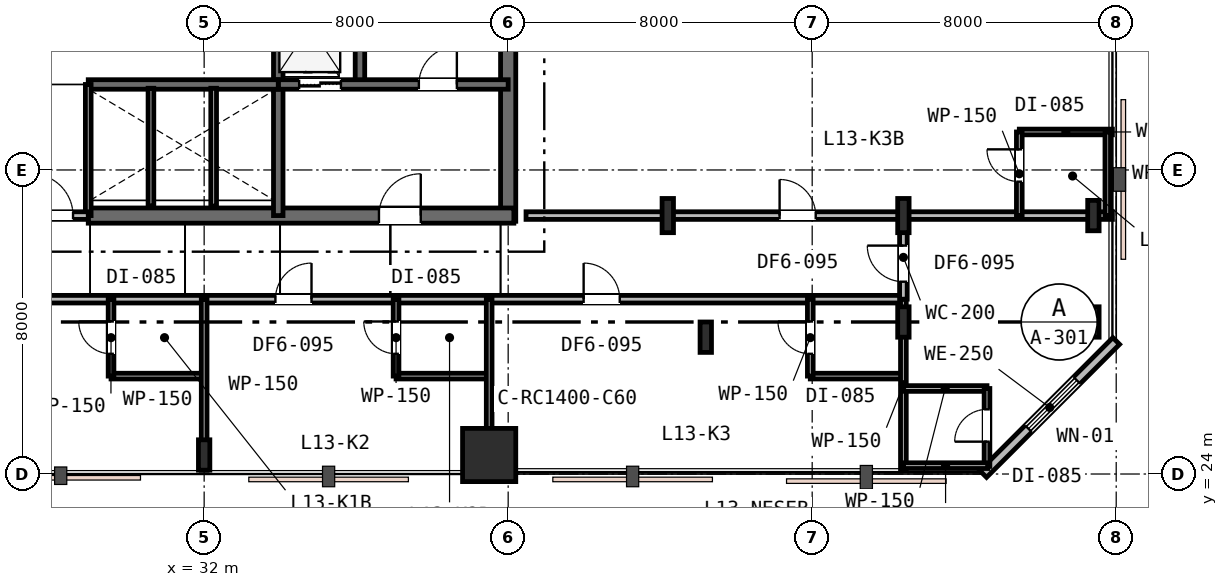
"""IFC4 building model, lengths in metres.
Left out: names, types, materials, properties, quantities, classifications, styles, units other than length and angle.
Written with IfcOpenShell. Run it as: python <this file> out.ifc"""

import sys

from ifc_helpers import new_model, si_unit, direction, frame, frame_2d, origin, origin_2d, place, context, subcontext, project, spatial, rectangle, i_section, extrude, element, fill, save


model = new_model("IFC4")
c1 = context("Model", 3, precision=1e-05, world=origin(), true_north=direction((0.0, 1.0)))
c2 = subcontext(c1, "Body", "Model", "MODEL_VIEW")
j1 = project(units=[si_unit("LENGTHUNIT", "METRE"), si_unit("PLANEANGLEUNIT", "RADIAN")], contexts=[c1])
p1 = place(None, origin())
s1 = spatial("IfcSite", under=j1, at=p1, CompositionType="ELEMENT")
p2 = place(p1, origin())
s2 = spatial("IfcBuilding", under=s1, at=p2, CompositionType="ELEMENT")
p3 = place(p2, frame((0.0, 0.0, 54.6)))
s3 = spatial("IfcBuildingStorey", under=s2, at=p3, CompositionType="ELEMENT", Elevation=54.6)
p4 = place(p3, frame((40.0, 30.65, 0.0), z_axis=(0.0, 0.0, 1.0), x_axis=(0.0, 1.0, 0.0)))
e1 = element("IfcWall", 1, at=p4, inside=s3, PredefinedType="SHEAR", context=c2, shape_type="SweptSolid", body=[
    extrude(rectangle(XDim=12.3, YDim=0.4, at=frame_2d((6.15, 0.0))), origin(), (0.0, 0.0, 1.0), 3.6),
])
p5 = place(p3, frame((28.95, 30.8, 0.0), z_axis=(0.0, 0.0, 1.0), x_axis=(1.0, 0.0, 0.0)))
e2 = element("IfcWall", 2, at=p5, inside=s3, PredefinedType="SHEAR", context=c2, shape_type="SweptSolid", body=[
    extrude(rectangle(XDim=11.2, YDim=0.4, at=frame_2d((5.6, 0.0))), origin(), (0.0, 0.0, 1.0), 3.6),
])
p6 = place(p5, frame((7.65, 0.0, 0.0)))
e3 = element("IfcOpeningElement", 3, at=p6, cuts=e2, PredefinedType="OPENING", context=c2, shape_type="SweptSolid", body=[
    extrude(rectangle(XDim=1.1, YDim=2.15, at=frame_2d((0.55, 1.075))), frame((0.0, 0.21, 0.0), z_axis=(0.0, -1.0, 0.0), x_axis=(1.0, 0.0, 0.0)), (0.0, 0.0, 1.0), 0.42),
])
p7 = place(p3, frame((36.1, 34.25, 0.0), z_axis=(0.0, 0.0, 1.0), x_axis=(0.0, 1.0, 0.0)))
e4 = element("IfcWall", 4, at=p7, inside=s3, PredefinedType="SHEAR", context=c2, shape_type="SweptSolid", body=[
    extrude(rectangle(XDim=8.65, YDim=0.25, at=frame_2d((4.325, 0.0))), origin(), (0.0, 0.0, 1.0), 3.6),
])
p8 = place(p3, frame((33.95, 30.8, 0.0), z_axis=(0.0, 0.0, 1.0), x_axis=(0.0, 1.0, 0.0)))
e5 = element("IfcWall", 5, at=p8, inside=s3, PredefinedType="SHEAR", context=c2, shape_type="SweptSolid", body=[
    extrude(rectangle(XDim=6.45, YDim=0.25, at=frame_2d((3.225, 0.0))), origin(), (0.0, 0.0, 1.0), 3.6),
])
p9 = place(p3, frame((33.95, 34.25, 0.0), z_axis=(0.0, 0.0, 1.0), x_axis=(1.0, 0.0, 0.0)))
e6 = element("IfcWall", 6, at=p9, inside=s3, PredefinedType="SHEAR", context=c2, shape_type="SweptSolid", body=[
    extrude(rectangle(XDim=6.05, YDim=0.25, at=frame_2d((3.025, 0.0))), origin(), (0.0, 0.0, 1.0), 3.6),
])
p10 = place(p9, frame((3.7, 0.0, 0.0)))
e7 = element("IfcOpeningElement", 7, at=p10, cuts=e6, PredefinedType="OPENING", context=c2, shape_type="SweptSolid", body=[
    extrude(rectangle(XDim=1.0, YDim=2.15, at=frame_2d((0.5, 1.075))), frame((0.0, 0.135, 0.0), z_axis=(0.0, -1.0, 0.0), x_axis=(1.0, 0.0, 0.0)), (0.0, 0.0, 1.0), 0.27),
])
p11 = place(p9, frame((0.55, 0.0, 0.0)))
e8 = element("IfcOpeningElement", 8, at=p11, cuts=e6, PredefinedType="OPENING", context=c2, shape_type="SweptSolid", body=[
    extrude(rectangle(XDim=1.1, YDim=2.15, at=frame_2d((0.55, 1.075))), frame((0.0, 0.135, 0.0), z_axis=(0.0, -1.0, 0.0), x_axis=(1.0, 0.0, 0.0)), (0.0, 0.0, 1.0), 0.27),
])
p12 = place(p3, frame((28.95, 34.25, 0.0), z_axis=(0.0, 0.0, 1.0), x_axis=(1.0, 0.0, 0.0)))
e9 = element("IfcWall", 9, at=p12, inside=s3, PredefinedType="SHEAR", context=c2, shape_type="SweptSolid", body=[
    extrude(rectangle(XDim=5.0, YDim=0.25, at=frame_2d((2.5, 0.0))), origin(), (0.0, 0.0, 1.0), 3.6),
])
p13 = place(p3, frame((32.0, 24.5, 0.0), z_axis=(0.0, 0.0, 1.0), x_axis=(1.0, 0.0, 0.0)))
e10 = element("IfcColumn", 10, at=p13, inside=s3, PredefinedType="COLUMN", context=c2, shape_type="SweptSolid", body=[
    extrude(i_section(OverallWidth=0.3, OverallDepth=0.8, WebThickness=0.018, FlangeThickness=0.033, FilletRadius=0.03, at=origin_2d()), origin(), (0.0, 0.0, 1.0), 3.6),
])
p14 = place(p3, frame((39.5, 24.5, 0.0), z_axis=(0.0, 0.0, 1.0), x_axis=(1.0, 0.0, 0.0)))
e11 = element("IfcColumn", 11, at=p14, inside=s3, PredefinedType="COLUMN", context=c2, shape_type="SweptSolid", body=[
    extrude(rectangle(XDim=1.4, YDim=1.4, at=origin_2d()), origin(), (0.0, 0.0, 1.0), 3.6),
])
for number, where, z_axis, x_axis in (
    (12, (45.2, 27.6, 0.0), (0.0, 0.0, 1.0), (1.0, 0.0, 0.0)),
    (13, (50.4, 28.0, 0.0), (0.0, 0.0, 1.0), (1.0, 0.0, 0.0)),
    (14, (55.4, 28.0, 0.0), (0.0, 0.0, 1.0), (1.0, 0.0, 0.0)),
    (15, (55.4, 30.8, 0.0), (0.0, 0.0, 1.0), (1.0, 0.0, 0.0)),
):
    element("IfcColumn", number, at=place(p3, frame(where, z_axis=z_axis, x_axis=x_axis)), inside=s3, PredefinedType="COLUMN", context=c2, shape_type="SweptSolid", body=[
        extrude(i_section(OverallWidth=0.3, OverallDepth=0.8, WebThickness=0.018, FlangeThickness=0.033, FilletRadius=0.03, at=origin_2d()), origin(), (0.0, 0.0, 1.0), 3.6),
    ])
for number, where, z_axis, x_axis in (
    (16, (44.2, 30.8, 0.0), (0.0, 0.0, 1.0), (1.0, 0.0, 0.0)),
    (17, (50.4, 30.8, 0.0), (0.0, 0.0, 1.0), (1.0, 0.0, 0.0)),
):
    element("IfcColumn", number, at=place(p3, frame(where, z_axis=z_axis, x_axis=x_axis)), inside=s3, PredefinedType="COLUMN", context=c2, shape_type="SweptSolid", body=[
        extrude(i_section(OverallWidth=0.3, OverallDepth=0.9, WebThickness=0.018, FlangeThickness=0.035, FilletRadius=0.03, at=origin_2d()), origin(), (0.0, 0.0, 1.0), 3.6),
    ])
p15 = place(p3, frame((52.5, 24.0, 0.0), z_axis=(0.0, 0.0, 1.0), x_axis=(0.707106781187, 0.707106781187, 0.0)))
e18 = element("IfcWall", 18, at=p15, inside=s3, PredefinedType="STANDARD", context=c2, shape_type="SweptSolid", body=[
    extrude(rectangle(XDim=4.95, YDim=0.25, at=frame_2d((2.475, 0.0))), origin(), (0.0, 0.0, 1.0), 3.33),
])
p16 = place(p15, frame((1.685, 0.0, 0.75)))
e19 = element("IfcOpeningElement", 19, at=p16, cuts=e18, PredefinedType="OPENING", context=c2, shape_type="SweptSolid", body=[
    extrude(rectangle(XDim=1.8, YDim=1.85, at=frame_2d((0.9, 0.925))), frame((0.0, 0.135, 0.0), z_axis=(0.0, -1.0, 0.0), x_axis=(1.0, 0.0, 0.0)), (0.0, 0.0, 1.0), 0.27),
])
p17 = place(p3, frame((28.95, 30.8, 0.0), z_axis=(0.0, 0.0, 1.0), x_axis=(0.0, 1.0, 0.0)))
e20 = element("IfcWall", 20, at=p17, inside=s3, PredefinedType="PLUMBINGWALL", context=c2, shape_type="SweptSolid", body=[
    extrude(rectangle(XDim=3.45, YDim=0.15, at=frame_2d((1.725, 0.0))), origin(), (0.0, 0.0, 1.0), 3.33),
])
p18 = place(p3, frame((27.05, 30.8, 0.0), z_axis=(0.0, 0.0, 1.0), x_axis=(1.0, 0.0, 0.0)))
e21 = element("IfcWall", 21, at=p18, inside=s3, PredefinedType="PARTITIONING", context=c2, shape_type="SweptSolid", body=[
    extrude(rectangle(XDim=1.9, YDim=0.2, at=frame_2d((0.95, 0.0))), origin(), (0.0, 0.0, 1.0), 3.33),
])
p19 = place(p18, frame((0.4, 0.0, 0.0)))
e22 = element("IfcOpeningElement", 22, at=p19, cuts=e21, PredefinedType="OPENING", context=c2, shape_type="SweptSolid", body=[
    extrude(rectangle(XDim=1.1, YDim=2.15, at=frame_2d((0.55, 1.075))), frame((0.0, 0.11, 0.0), z_axis=(0.0, -1.0, 0.0), x_axis=(1.0, 0.0, 0.0)), (0.0, 0.0, 1.0), 0.22),
])
for number, where, z_axis, x_axis in (
    (23, (30.6, 31.05, 0.0), (0.0, 0.0, 1.0), (0.0, 1.0, 0.0)),
    (24, (32.25, 31.05, 0.0), (0.0, 0.0, 1.0), (0.0, 1.0, 0.0)),
):
    element("IfcWall", number, at=place(p3, frame(where, z_axis=z_axis, x_axis=x_axis)), inside=s3, PredefinedType="PLUMBINGWALL", context=c2, shape_type="SweptSolid", body=[
        extrude(rectangle(XDim=3.1, YDim=0.15, at=frame_2d((1.55, 0.0))), origin(), (0.0, 0.0, 1.0), 3.33),
    ])
p20 = place(p3, frame((21.8, 28.6, 0.0), z_axis=(0.0, 0.0, 1.0), x_axis=(1.0, 0.0, 0.0)))
e25 = element("IfcWall", 25, at=p20, inside=s3, PredefinedType="PARTITIONING", context=c2, shape_type="SweptSolid", body=[
    extrude(rectangle(XDim=28.6, YDim=0.2, at=frame_2d((14.3, 0.0))), origin(), (0.0, 0.0, 1.0), 2.82),
])
p21 = place(p20, frame((4.3, 0.0, 0.0)))
e26 = element("IfcOpeningElement", 26, at=p21, cuts=e25, PredefinedType="OPENING", context=c2, shape_type="SweptSolid", body=[
    extrude(rectangle(XDim=0.95, YDim=2.15, at=frame_2d((0.475, 1.075))), frame((0.0, 0.11, 0.0), z_axis=(0.0, -1.0, 0.0), x_axis=(1.0, 0.0, 0.0)), (0.0, 0.0, 1.0), 0.22),
])
p22 = place(p20, frame((12.075, 0.0, 0.0)))
e27 = element("IfcOpeningElement", 27, at=p22, cuts=e25, PredefinedType="OPENING", context=c2, shape_type="SweptSolid", body=[
    extrude(rectangle(XDim=0.95, YDim=2.15, at=frame_2d((0.475, 1.075))), frame((0.0, 0.11, 0.0), z_axis=(0.0, -1.0, 0.0), x_axis=(1.0, 0.0, 0.0)), (0.0, 0.0, 1.0), 0.22),
])
p23 = place(p20, frame((20.186, 0.0, 0.0)))
e28 = element("IfcOpeningElement", 28, at=p23, cuts=e25, PredefinedType="OPENING", context=c2, shape_type="SweptSolid", body=[
    extrude(rectangle(XDim=0.95, YDim=2.15, at=frame_2d((0.475, 1.075))), frame((0.0, 0.11, 0.0), z_axis=(0.0, -1.0, 0.0), x_axis=(1.0, 0.0, 0.0)), (0.0, 0.0, 1.0), 0.22),
])
p24 = place(p3, frame((29.55, 26.576, 0.0), z_axis=(0.0, 0.0, 1.0), x_axis=(1.0, 0.0, 0.0)))
e29 = element("IfcWall", 29, at=p24, inside=s3, PredefinedType="PARTITIONING", context=c2, shape_type="SweptSolid", body=[
    extrude(rectangle(XDim=2.45, YDim=0.15, at=frame_2d((1.225, 0.0))), origin(), (0.0, 0.0, 1.0), 3.33),
])
p25 = place(p3, frame((29.55, 26.576, 0.0), z_axis=(0.0, 0.0, 1.0), x_axis=(0.0, 1.0, 0.0)))
e30 = element("IfcWall", 30, at=p25, inside=s3, PredefinedType="PARTITIONING", context=c2, shape_type="SweptSolid", body=[
    extrude(rectangle(XDim=2.024, YDim=0.15, at=frame_2d((1.012, 0.0))), origin(), (0.0, 0.0, 1.0), 3.33),
])
p26 = place(p25, frame((0.587, 0.0, 0.0)))
e31 = element("IfcOpeningElement", 31, at=p26, cuts=e30, PredefinedType="OPENING", context=c2, shape_type="SweptSolid", body=[
    extrude(rectangle(XDim=0.85, YDim=2.15, at=frame_2d((0.425, 1.075))), frame((0.0, 0.085, 0.0), z_axis=(0.0, -1.0, 0.0), x_axis=(1.0, 0.0, 0.0)), (0.0, 0.0, 1.0), 0.17),
])
p27 = place(p3, frame((32.0, 28.6, 0.0), z_axis=(0.0, 0.0, 1.0), x_axis=(0.0, -1.0, 0.0)))
e32 = element("IfcWall", 32, at=p27, inside=s3, PredefinedType="PARTITIONING", context=c2, shape_type="SweptSolid", body=[
    extrude(rectangle(XDim=4.5, YDim=0.15, at=frame_2d((2.25, 0.0))), origin(), (0.0, 0.0, 1.0), 2.93),
])
p28 = place(p3, frame((37.05, 26.576, 0.0), z_axis=(0.0, 0.0, 1.0), x_axis=(1.0, 0.0, 0.0)))
e33 = element("IfcWall", 33, at=p28, inside=s3, PredefinedType="PARTITIONING", context=c2, shape_type="SweptSolid", body=[
    extrude(rectangle(XDim=2.45, YDim=0.15, at=frame_2d((1.225, 0.0))), origin(), (0.0, 0.0, 1.0), 2.82),
])
p29 = place(p3, frame((37.05, 26.576, 0.0), z_axis=(0.0, 0.0, 1.0), x_axis=(0.0, 1.0, 0.0)))
e34 = element("IfcWall", 34, at=p29, inside=s3, PredefinedType="PARTITIONING", context=c2, shape_type="SweptSolid", body=[
    extrude(rectangle(XDim=2.024, YDim=0.15, at=frame_2d((1.012, 0.0))), origin(), (0.0, 0.0, 1.0), 2.96),
])
p30 = place(p29, frame((0.587, 0.0, 0.0)))
e35 = element("IfcOpeningElement", 35, at=p30, cuts=e34, PredefinedType="OPENING", context=c2, shape_type="SweptSolid", body=[
    extrude(rectangle(XDim=0.85, YDim=2.15, at=frame_2d((0.425, 1.075))), frame((0.0, 0.085, 0.0), z_axis=(0.0, -1.0, 0.0), x_axis=(1.0, 0.0, 0.0)), (0.0, 0.0, 1.0), 0.17),
])
p31 = place(p3, frame((39.5, 28.6, 0.0), z_axis=(0.0, 0.0, 1.0), x_axis=(0.0, -1.0, 0.0)))
e36 = element("IfcWall", 36, at=p31, inside=s3, PredefinedType="PARTITIONING", context=c2, shape_type="SweptSolid", body=[
    extrude(rectangle(XDim=4.5, YDim=0.15, at=frame_2d((2.25, 0.0))), origin(), (0.0, 0.0, 1.0), 2.82),
])
p32 = place(p3, frame((47.95, 26.576, 0.0), z_axis=(0.0, 0.0, 1.0), x_axis=(1.0, 0.0, 0.0)))
e37 = element("IfcWall", 37, at=p32, inside=s3, PredefinedType="PARTITIONING", context=c2, shape_type="SweptSolid", body=[
    extrude(rectangle(XDim=2.45, YDim=0.15, at=frame_2d((1.225, 0.0))), origin(), (0.0, 0.0, 1.0), 3.33),
])
p33 = place(p3, frame((47.95, 26.576, 0.0), z_axis=(0.0, 0.0, 1.0), x_axis=(0.0, 1.0, 0.0)))
e38 = element("IfcWall", 38, at=p33, inside=s3, PredefinedType="PARTITIONING", context=c2, shape_type="SweptSolid", body=[
    extrude(rectangle(XDim=2.024, YDim=0.15, at=frame_2d((1.012, 0.0))), origin(), (0.0, 0.0, 1.0), 3.33),
])
p34 = place(p33, frame((0.587, 0.0, 0.0)))
e39 = element("IfcOpeningElement", 39, at=p34, cuts=e38, PredefinedType="OPENING", context=c2, shape_type="SweptSolid", body=[
    extrude(rectangle(XDim=0.85, YDim=2.15, at=frame_2d((0.425, 1.075))), frame((0.0, 0.085, 0.0), z_axis=(0.0, -1.0, 0.0), x_axis=(1.0, 0.0, 0.0)), (0.0, 0.0, 1.0), 0.17),
])
p35 = place(p3, frame((50.4, 28.6, 0.0), z_axis=(0.0, 0.0, 1.0), x_axis=(0.0, -1.0, 0.0)))
e40 = element("IfcWall", 40, at=p35, inside=s3, PredefinedType="PARTITIONING", context=c2, shape_type="SweptSolid", body=[
    extrude(rectangle(XDim=4.5, YDim=0.15, at=frame_2d((2.25, 0.0))), origin(), (0.0, 0.0, 1.0), 2.82),
])
p36 = place(p3, frame((40.47, 30.8, 0.0), z_axis=(0.0, 0.0, 1.0), x_axis=(1.0, 0.0, 0.0)))
e41 = element("IfcWall", 41, at=p36, inside=s3, PredefinedType="PARTITIONING", context=c2, shape_type="SweptSolid", body=[
    extrude(rectangle(XDim=15.43, YDim=0.2, at=frame_2d((7.715, 0.0))), origin(), (0.0, 0.0, 1.0), 2.82),
])
p37 = place(p36, frame((6.673, 0.0, 0.0)))
e42 = element("IfcOpeningElement", 42, at=p37, cuts=e41, PredefinedType="OPENING", context=c2, shape_type="SweptSolid", body=[
    extrude(rectangle(XDim=0.95, YDim=2.15, at=frame_2d((0.475, 1.075))), frame((0.0, 0.11, 0.0), z_axis=(0.0, -1.0, 0.0), x_axis=(1.0, 0.0, 0.0)), (0.0, 0.0, 1.0), 0.22),
])
p38 = place(p3, frame((53.45, 33.0, 0.0), z_axis=(0.0, 0.0, 1.0), x_axis=(1.0, 0.0, 0.0)))
e43 = element("IfcWall", 43, at=p38, inside=s3, PredefinedType="PARTITIONING", context=c2, shape_type="SweptSolid", body=[
    extrude(rectangle(XDim=2.45, YDim=0.15, at=frame_2d((1.225, 0.0))), origin(), (0.0, 0.0, 1.0), 2.93),
])
p39 = place(p3, frame((53.45, 30.8, 0.0), z_axis=(0.0, 0.0, 1.0), x_axis=(0.0, 1.0, 0.0)))
e44 = element("IfcWall", 44, at=p39, inside=s3, PredefinedType="PARTITIONING", context=c2, shape_type="SweptSolid", body=[
    extrude(rectangle(XDim=2.2, YDim=0.15, at=frame_2d((1.1, 0.0))), origin(), (0.0, 0.0, 1.0), 2.82),
])
p40 = place(p39, frame((0.892, 0.0, 0.0)))
e45 = element("IfcOpeningElement", 45, at=p40, cuts=e44, PredefinedType="OPENING", context=c2, shape_type="SweptSolid", body=[
    extrude(rectangle(XDim=0.85, YDim=2.15, at=frame_2d((0.425, 1.075))), frame((0.0, 0.085, 0.0), z_axis=(0.0, -1.0, 0.0), x_axis=(1.0, 0.0, 0.0)), (0.0, 0.0, 1.0), 0.17),
])
p41 = place(p3, frame((55.78, 33.0, 0.0), z_axis=(0.0, 0.0, 1.0), x_axis=(0.0, -1.0, 0.0)))
e46 = element("IfcWall", 46, at=p41, inside=s3, PredefinedType="PARTITIONING", context=c2, shape_type="SweptSolid", body=[
    extrude(rectangle(XDim=2.2, YDim=0.15, at=frame_2d((1.1, 0.0))), origin(), (0.0, 0.0, 1.0), 2.82),
])
p42 = place(p3, frame((50.4, 28.6, 0.0), z_axis=(0.0, 0.0, 1.0), x_axis=(0.0, 1.0, 0.0)))
e47 = element("IfcWall", 47, at=p42, inside=s3, PredefinedType="PARTITIONING", context=c2, shape_type="SweptSolid", body=[
    extrude(rectangle(XDim=2.2, YDim=0.2, at=frame_2d((1.1, 0.0))), origin(), (0.0, 0.0, 1.0), 2.82),
])
p43 = place(p42, frame((0.46, 0.0, 0.0)))
e48 = element("IfcOpeningElement", 48, at=p43, cuts=e47, PredefinedType="OPENING", context=c2, shape_type="SweptSolid", body=[
    extrude(rectangle(XDim=0.95, YDim=2.15, at=frame_2d((0.475, 1.075))), frame((0.0, 0.11, 0.0), z_axis=(0.0, -1.0, 0.0), x_axis=(1.0, 0.0, 0.0)), (0.0, 0.0, 1.0), 0.22),
])
p44 = place(p3, frame((50.4, 26.25, 0.0), z_axis=(0.0, 0.0, 1.0), x_axis=(1.0, 0.0, 0.0)))
e49 = element("IfcWall", 49, at=p44, inside=s3, PredefinedType="PARTITIONING", context=c2, shape_type="SweptSolid", body=[
    extrude(rectangle(XDim=2.2, YDim=0.15, at=frame_2d((1.1, 0.0))), origin(), (0.0, 0.0, 1.0), 3.33),
])
p45 = place(p3, frame((52.6, 24.2, 0.0), z_axis=(0.0, 0.0, 1.0), x_axis=(0.0, 1.0, 0.0)))
e50 = element("IfcWall", 50, at=p45, inside=s3, PredefinedType="PARTITIONING", context=c2, shape_type="SweptSolid", body=[
    extrude(rectangle(XDim=2.05, YDim=0.15, at=frame_2d((1.025, 0.0))), origin(), (0.0, 0.0, 1.0), 3.33),
])
p46 = place(p45, frame((0.651, 0.0, 0.0)))
e51 = element("IfcOpeningElement", 51, at=p46, cuts=e50, PredefinedType="OPENING", context=c2, shape_type="SweptSolid", body=[
    extrude(rectangle(XDim=0.85, YDim=2.15, at=frame_2d((0.425, 1.075))), frame((0.0, 0.085, 0.0), z_axis=(0.0, -1.0, 0.0), x_axis=(1.0, 0.0, 0.0)), (0.0, 0.0, 1.0), 0.17),
])
p47 = place(p3, frame((52.62, 24.22, 0.0), z_axis=(0.0, 0.0, 1.0), x_axis=(-1.0, 0.0, 0.0)))
e52 = element("IfcWall", 52, at=p47, inside=s3, PredefinedType="PARTITIONING", context=c2, shape_type="SweptSolid", body=[
    extrude(rectangle(XDim=2.22, YDim=0.15, at=frame_2d((1.11, 0.0))), origin(), (0.0, 0.0, 1.0), 3.33),
])
p48 = place(p16, origin())
e53 = element("IfcWindow", 53, at=p48, inside=s3, PartitioningType="SINGLE_PANEL", PredefinedType="WINDOW", context=c2, shape_type="SweptSolid", body=[
    extrude(rectangle(XDim=1.8, YDim=1.85, at=frame_2d((0.9, 0.925))), frame((0.0, 0.03, 0.0), z_axis=(0.0, -1.0, 0.0), x_axis=(1.0, 0.0, 0.0)), (0.0, 0.0, 1.0), 0.06),
])
fill(e19, e53)
p49 = place(p19, origin())
e54 = element("IfcDoor", 54, at=p49, inside=s3, OperationType="SINGLE_SWING_LEFT", PredefinedType="DOOR", context=c2, shape_type="SweptSolid", body=[
    extrude(rectangle(XDim=1.1, YDim=2.15, at=frame_2d((0.55, 1.075))), frame((0.0, 0.025, 0.0), z_axis=(0.0, -1.0, 0.0), x_axis=(1.0, 0.0, 0.0)), (0.0, 0.0, 1.0), 0.05),
])
fill(e22, e54)
p50 = place(p10, origin())
e55 = element("IfcDoor", 55, at=p50, inside=s3, OperationType="SINGLE_SWING_RIGHT", PredefinedType="DOOR", context=c2, shape_type="SweptSolid", body=[
    extrude(rectangle(XDim=1.0, YDim=2.15, at=frame_2d((0.5, 1.075))), frame((0.0, 0.025, 0.0), z_axis=(0.0, -1.0, 0.0), x_axis=(1.0, 0.0, 0.0)), (0.0, 0.0, 1.0), 0.05),
])
fill(e7, e55)
p51 = place(p6, origin())
e56 = element("IfcDoor", 56, at=p51, inside=s3, OperationType="SINGLE_SWING_RIGHT", PredefinedType="DOOR", context=c2, shape_type="SweptSolid", body=[
    extrude(rectangle(XDim=1.1, YDim=2.15, at=frame_2d((0.55, 1.075))), frame((0.0, 0.025, 0.0), z_axis=(0.0, -1.0, 0.0), x_axis=(1.0, 0.0, 0.0)), (0.0, 0.0, 1.0), 0.05),
])
fill(e3, e56)
p52 = place(p26, origin())
e57 = element("IfcDoor", 57, at=p52, inside=s3, OperationType="SINGLE_SWING_RIGHT", PredefinedType="DOOR", context=c2, shape_type="SweptSolid", body=[
    extrude(rectangle(XDim=0.85, YDim=2.15, at=frame_2d((0.425, 1.075))), frame((0.0, 0.025, 0.0), z_axis=(0.0, -1.0, 0.0), x_axis=(1.0, 0.0, 0.0)), (0.0, 0.0, 1.0), 0.05),
])
fill(e31, e57)
p53 = place(p22, origin())
e58 = element("IfcDoor", 58, at=p53, inside=s3, OperationType="SINGLE_SWING_RIGHT", PredefinedType="DOOR", context=c2, shape_type="SweptSolid", body=[
    extrude(rectangle(XDim=0.95, YDim=2.15, at=frame_2d((0.475, 1.075))), frame((0.0, 0.025, 0.0), z_axis=(0.0, -1.0, 0.0), x_axis=(1.0, 0.0, 0.0)), (0.0, 0.0, 1.0), 0.05),
])
fill(e27, e58)
p54 = place(p30, origin())
e59 = element("IfcDoor", 59, at=p54, inside=s3, OperationType="SINGLE_SWING_RIGHT", PredefinedType="DOOR", context=c2, shape_type="SweptSolid", body=[
    extrude(rectangle(XDim=0.85, YDim=2.15, at=frame_2d((0.425, 1.075))), frame((0.0, 0.025, 0.0), z_axis=(0.0, -1.0, 0.0), x_axis=(1.0, 0.0, 0.0)), (0.0, 0.0, 1.0), 0.05),
])
fill(e35, e59)
p55 = place(p23, origin())
e60 = element("IfcDoor", 60, at=p55, inside=s3, OperationType="SINGLE_SWING_LEFT", PredefinedType="DOOR", context=c2, shape_type="SweptSolid", body=[
    extrude(rectangle(XDim=0.95, YDim=2.15, at=frame_2d((0.475, 1.075))), frame((0.0, 0.025, 0.0), z_axis=(0.0, -1.0, 0.0), x_axis=(1.0, 0.0, 0.0)), (0.0, 0.0, 1.0), 0.05),
])
fill(e28, e60)
p56 = place(p34, origin())
e61 = element("IfcDoor", 61, at=p56, inside=s3, OperationType="SINGLE_SWING_RIGHT", PredefinedType="DOOR", context=c2, shape_type="SweptSolid", body=[
    extrude(rectangle(XDim=0.85, YDim=2.15, at=frame_2d((0.425, 1.075))), frame((0.0, 0.025, 0.0), z_axis=(0.0, -1.0, 0.0), x_axis=(1.0, 0.0, 0.0)), (0.0, 0.0, 1.0), 0.05),
])
fill(e39, e61)
p57 = place(p37, origin())
e62 = element("IfcDoor", 62, at=p57, inside=s3, OperationType="SINGLE_SWING_LEFT", PredefinedType="DOOR", context=c2, shape_type="SweptSolid", body=[
    extrude(rectangle(XDim=0.95, YDim=2.15, at=frame_2d((0.475, 1.075))), frame((0.0, 0.025, 0.0), z_axis=(0.0, -1.0, 0.0), x_axis=(1.0, 0.0, 0.0)), (0.0, 0.0, 1.0), 0.05),
])
fill(e42, e62)
p58 = place(p40, origin())
e63 = element("IfcDoor", 63, at=p58, inside=s3, OperationType="SINGLE_SWING_RIGHT", PredefinedType="DOOR", context=c2, shape_type="SweptSolid", body=[
    extrude(rectangle(XDim=0.85, YDim=2.15, at=frame_2d((0.425, 1.075))), frame((0.0, 0.025, 0.0), z_axis=(0.0, -1.0, 0.0), x_axis=(1.0, 0.0, 0.0)), (0.0, 0.0, 1.0), 0.05),
])
fill(e45, e63)
p59 = place(p43, origin())
e64 = element("IfcDoor", 64, at=p59, inside=s3, OperationType="SINGLE_SWING_RIGHT", PredefinedType="DOOR", context=c2, shape_type="SweptSolid", body=[
    extrude(rectangle(XDim=0.95, YDim=2.15, at=frame_2d((0.475, 1.075))), frame((0.0, 0.025, 0.0), z_axis=(0.0, -1.0, 0.0), x_axis=(1.0, 0.0, 0.0)), (0.0, 0.0, 1.0), 0.05),
])
fill(e48, e64)
p60 = place(p46, origin())
e65 = element("IfcDoor", 65, at=p60, inside=s3, OperationType="SINGLE_SWING_LEFT", PredefinedType="DOOR", context=c2, shape_type="SweptSolid", body=[
    extrude(rectangle(XDim=0.85, YDim=2.15, at=frame_2d((0.425, 1.075))), frame((0.0, 0.025, 0.0), z_axis=(0.0, -1.0, 0.0), x_axis=(1.0, 0.0, 0.0)), (0.0, 0.0, 1.0), 0.05),
])
fill(e51, e65)
p61 = place(p11, origin())
e66 = element("IfcDoor", 66, at=p61, inside=s3, OperationType="DOUBLE_DOOR_SLIDING", PredefinedType="DOOR", context=c2, shape_type="SweptSolid", body=[
    extrude(rectangle(XDim=1.1, YDim=2.15, at=frame_2d((0.55, 1.075))), frame((0.0, 0.025, 0.0), z_axis=(0.0, -1.0, 0.0), x_axis=(1.0, 0.0, 0.0)), (0.0, 0.0, 1.0), 0.05),
])
fill(e8, e66)
save(model, sys.argv[1])
